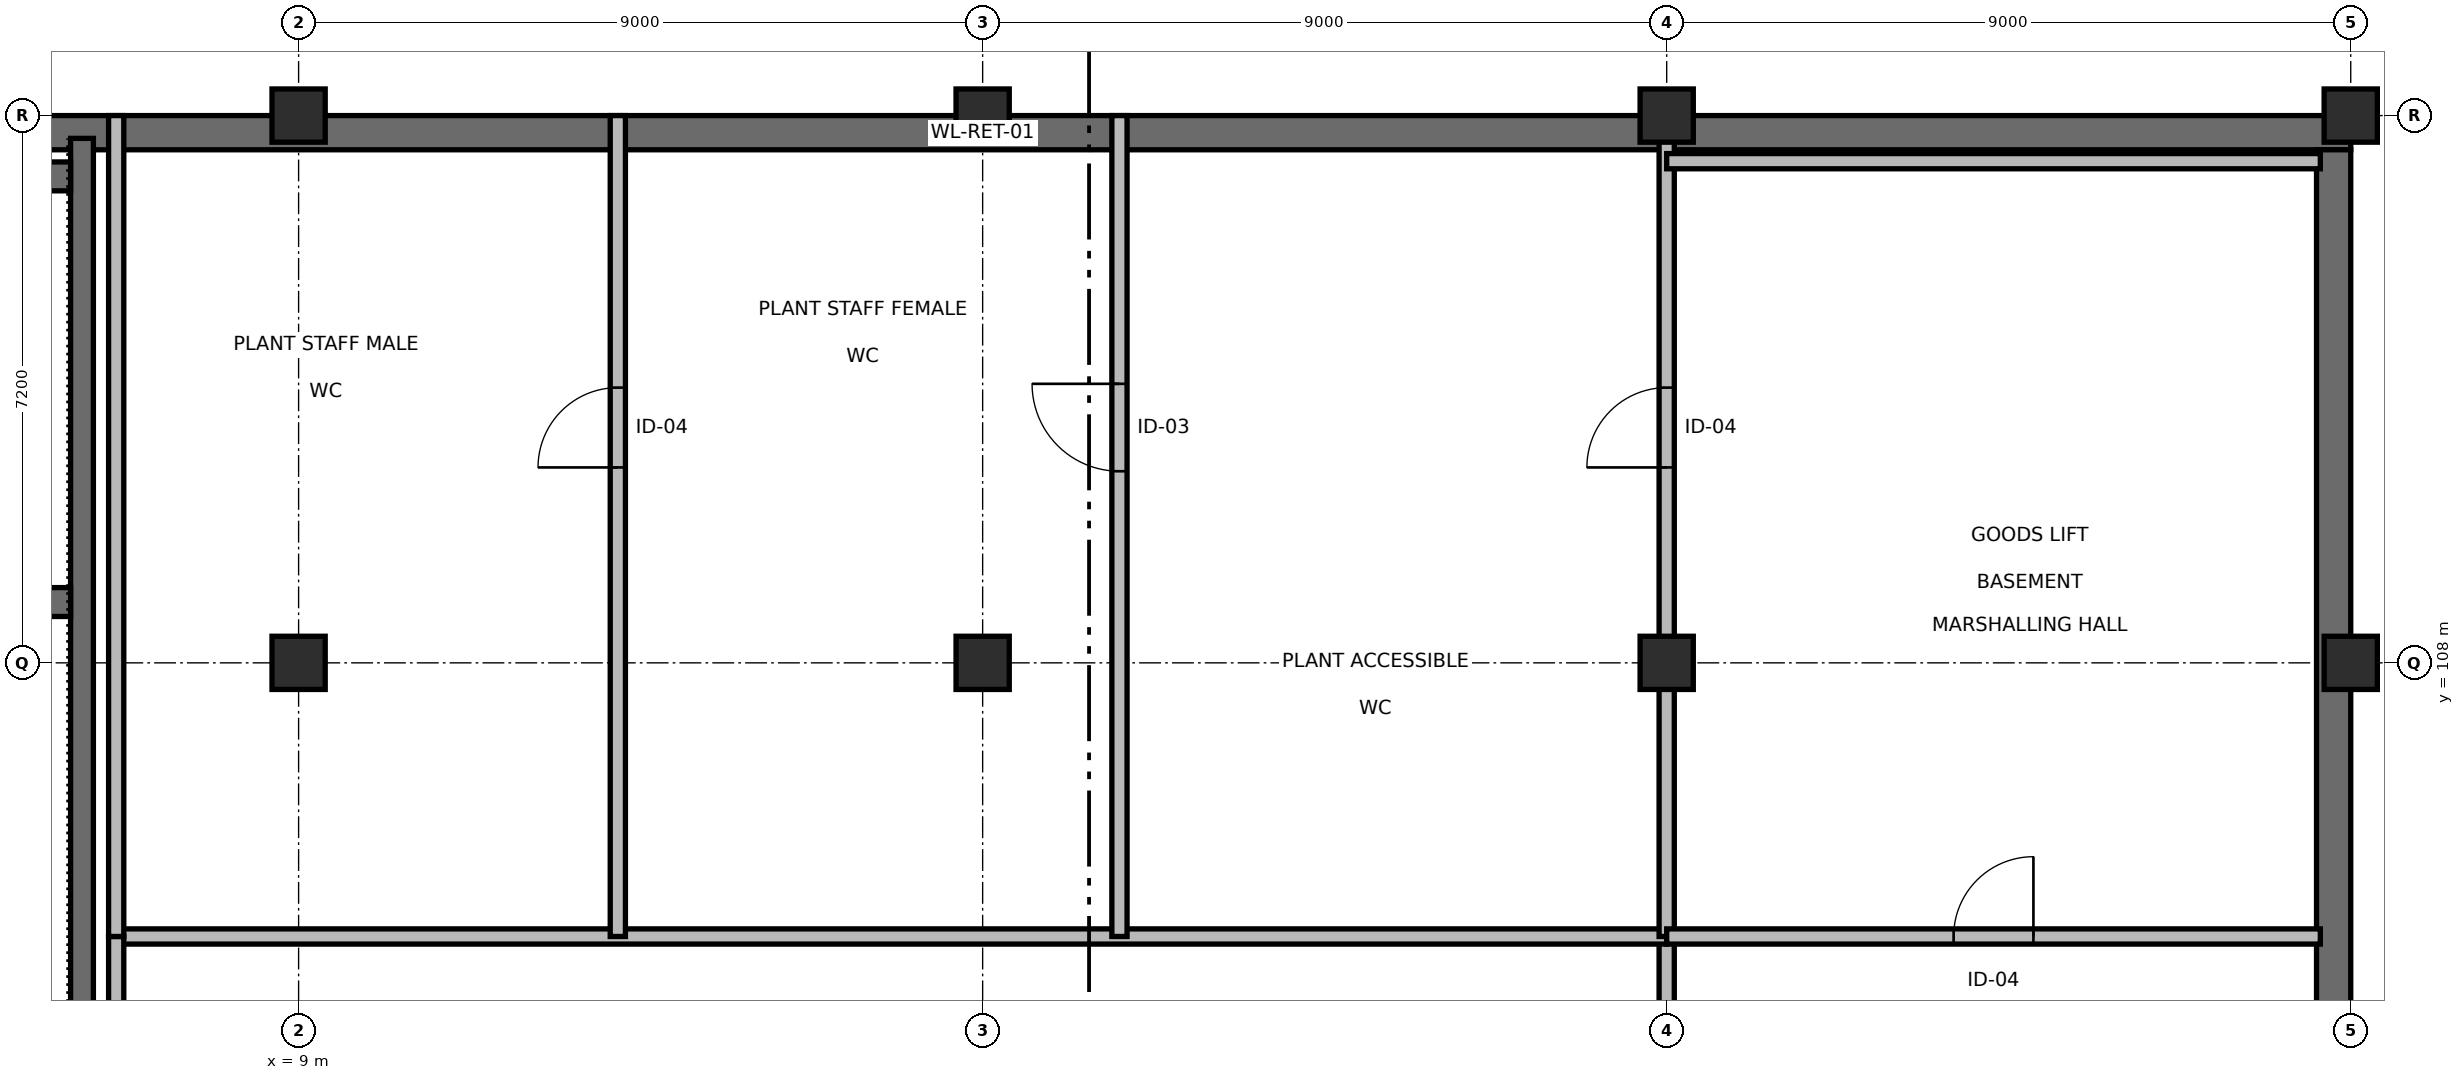
"""IFC4 building model, lengths in metres.
Left out: names, types, materials, properties, quantities, classifications, styles, units other than length and angle.
Written with IfcOpenShell. Run it as: python <this file> out.ifc"""

import sys

from ifc_helpers import new_model, si_unit, direction, frame, frame_2d, origin, origin_2d, place, context, subcontext, project, spatial, rectangle, extrude, element, fill, save


model = new_model("IFC4")
c1 = context("Model", 3, precision=1e-05, world=origin(), true_north=direction((0.0, 1.0)))
c2 = subcontext(c1, "Body", "Model", "MODEL_VIEW")
j1 = project(units=[si_unit("LENGTHUNIT", "METRE"), si_unit("PLANEANGLEUNIT", "RADIAN")], contexts=[c1])
p1 = place(None, origin())
s1 = spatial("IfcSite", under=j1, at=p1, CompositionType="ELEMENT")
p2 = place(p1, origin())
s2 = spatial("IfcBuilding", under=s1, at=p2, CompositionType="ELEMENT")
p3 = place(p2, frame((0.0, 0.0, -4.8)))
s3 = spatial("IfcBuildingStorey", under=s2, at=p3, CompositionType="ELEMENT", Elevation=-4.8)
for number, where, z_axis, x_axis in (
    (1, (9.0, 108.0, 0.0), (0.0, 0.0, 1.0), (1.0, 0.0, 0.0)),
    (2, (9.0, 115.2, 0.0), (0.0, 0.0, 1.0), (1.0, 0.0, 0.0)),
    (3, (18.0, 108.0, 0.0), (0.0, 0.0, 1.0), (1.0, 0.0, 0.0)),
    (4, (18.0, 115.2, 0.0), (0.0, 0.0, 1.0), (1.0, 0.0, 0.0)),
    (5, (27.0, 108.0, 0.0), (0.0, 0.0, 1.0), (1.0, 0.0, 0.0)),
    (6, (27.0, 115.2, 0.0), (0.0, 0.0, 1.0), (1.0, 0.0, 0.0)),
    (7, (36.0, 108.0, 0.0), (0.0, 0.0, 1.0), (1.0, 0.0, 0.0)),
    (8, (36.0, 115.2, 0.0), (0.0, 0.0, 1.0), (1.0, 0.0, 0.0)),
):
    element("IfcColumn", number, at=place(p3, frame(where, z_axis=z_axis, x_axis=x_axis)), inside=s3, PredefinedType="COLUMN", context=c2, shape_type="SweptSolid", body=[
        extrude(rectangle(XDim=0.7, YDim=0.7, at=origin_2d()), origin(), (0.0, 0.0, 1.0), 4.8),
    ])
p4 = place(p3, frame((0.0, 114.975, 0.0), z_axis=(0.0, 0.0, 1.0), x_axis=(1.0, 0.0, 0.0)))
e9 = element("IfcWall", 9, at=p4, inside=s3, PredefinedType="USERDEFINED", context=c2, shape_type="SweptSolid", body=[
    extrude(rectangle(XDim=36.0, YDim=0.45, at=frame_2d((18.0, 0.0))), origin(), (0.0, 0.0, 1.0), 4.5),
])
p5 = place(p3, frame((35.775, 4.65, 0.0), z_axis=(0.0, 0.0, 1.0), x_axis=(0.0, 1.0, 0.0)))
e10 = element("IfcWall", 10, at=p5, inside=s3, PredefinedType="USERDEFINED", context=c2, shape_type="SweptSolid", body=[
    extrude(rectangle(XDim=110.1, YDim=0.45, at=frame_2d((55.05, 0.0))), origin(), (0.0, 0.0, 1.0), 4.5),
])
p6 = place(p3, frame((6.15, 73.2, 0.0), z_axis=(0.0, 0.0, 1.0), x_axis=(0.0, 1.0, 0.0)))
e11 = element("IfcWall", 11, at=p6, inside=s3, PredefinedType="USERDEFINED", context=c2, shape_type="SweptSolid", body=[
    extrude(rectangle(XDim=41.7, YDim=0.3, at=frame_2d((20.85, 0.0))), origin(), (0.0, 0.0, 1.0), 4.45),
])
p7 = place(p3, frame((27.0, 86.4, 0.0), z_axis=(0.0, 0.0, 1.0), x_axis=(0.0, 1.0, 0.0)))
e12 = element("IfcWall", 12, at=p7, inside=s3, PredefinedType="PARTITIONING", context=c2, shape_type="SweptSolid", body=[
    extrude(rectangle(XDim=18.0, YDim=0.2, at=frame_2d((9.0, 0.0))), origin(), (0.0, 0.0, 1.0), 3.735),
])
p8 = place(p7, frame((4.465, 0.0, 0.0)))
e13 = element("IfcOpeningElement", 13, at=p8, cuts=e12, PredefinedType="OPENING", context=c2, shape_type="SweptSolid", body=[
    extrude(rectangle(XDim=1.15, YDim=2.2, at=frame_2d((0.575, 1.1))), frame((0.0, 0.11, 0.0), z_axis=(0.0, -1.0, 0.0), x_axis=(1.0, 0.0, 0.0)), (0.0, 0.0, 1.0), 0.22),
])
p9 = place(p3, frame((6.6, 104.4, 0.0), z_axis=(0.0, 0.0, 1.0), x_axis=(1.0, 0.0, 0.0)))
e14 = element("IfcWall", 14, at=p9, inside=s3, PredefinedType="PARTITIONING", context=c2, shape_type="SweptSolid", body=[
    extrude(rectangle(XDim=20.4, YDim=0.2, at=frame_2d((10.2, 0.0))), origin(), (0.0, 0.0, 1.0), 3.735),
])
p10 = place(p3, frame((6.6, 86.4, 0.0), z_axis=(0.0, 0.0, 1.0), x_axis=(0.0, 1.0, 0.0)))
e15 = element("IfcWall", 15, at=p10, inside=s3, PredefinedType="PARTITIONING", context=c2, shape_type="SweptSolid", body=[
    extrude(rectangle(XDim=18.0, YDim=0.2, at=frame_2d((9.0, 0.0))), origin(), (0.0, 0.0, 1.0), 4.485),
])
p11 = place(p3, frame((13.2, 104.4, 0.0), z_axis=(0.0, 0.0, 1.0), x_axis=(0.0, 1.0, 0.0)))
e16 = element("IfcWall", 16, at=p11, inside=s3, PredefinedType="PARTITIONING", context=c2, shape_type="SweptSolid", body=[
    extrude(rectangle(XDim=10.8, YDim=0.2, at=frame_2d((5.4, 0.0))), origin(), (0.0, 0.0, 1.0), 3.785),
])
p12 = place(p11, frame((6.171, 0.0, 0.0)))
e17 = element("IfcOpeningElement", 17, at=p12, cuts=e16, PredefinedType="OPENING", context=c2, shape_type="SweptSolid", body=[
    extrude(rectangle(XDim=1.05, YDim=2.15, at=frame_2d((0.525, 1.075))), frame((0.0, 0.11, 0.0), z_axis=(0.0, -1.0, 0.0), x_axis=(1.0, 0.0, 0.0)), (0.0, 0.0, 1.0), 0.22),
])
p13 = place(p3, frame((6.6, 104.4, 0.0), z_axis=(0.0, 0.0, 1.0), x_axis=(0.0, 1.0, 0.0)))
e18 = element("IfcWall", 18, at=p13, inside=s3, PredefinedType="PARTITIONING", context=c2, shape_type="SweptSolid", body=[
    extrude(rectangle(XDim=10.8, YDim=0.2, at=frame_2d((5.4, 0.0))), origin(), (0.0, 0.0, 1.0), 3.785),
])
p14 = place(p3, frame((19.8, 104.4, 0.0), z_axis=(0.0, 0.0, 1.0), x_axis=(0.0, 1.0, 0.0)))
e19 = element("IfcWall", 19, at=p14, inside=s3, PredefinedType="PARTITIONING", context=c2, shape_type="SweptSolid", body=[
    extrude(rectangle(XDim=10.8, YDim=0.2, at=frame_2d((5.4, 0.0))), origin(), (0.0, 0.0, 1.0), 3.785),
])
p15 = place(p14, frame((6.121, 0.0, 0.0)))
e20 = element("IfcOpeningElement", 20, at=p15, cuts=e19, PredefinedType="OPENING", context=c2, shape_type="SweptSolid", body=[
    extrude(rectangle(XDim=1.15, YDim=2.2, at=frame_2d((0.575, 1.1))), frame((0.0, 0.11, 0.0), z_axis=(0.0, -1.0, 0.0), x_axis=(1.0, 0.0, 0.0)), (0.0, 0.0, 1.0), 0.22),
])
p16 = place(p3, frame((27.0, 104.4, 0.0), z_axis=(0.0, 0.0, 1.0), x_axis=(0.0, 1.0, 0.0)))
e21 = element("IfcWall", 21, at=p16, inside=s3, PredefinedType="PARTITIONING", context=c2, shape_type="SweptSolid", body=[
    extrude(rectangle(XDim=10.8, YDim=0.2, at=frame_2d((5.4, 0.0))), origin(), (0.0, 0.0, 1.0), 3.735),
])
p17 = place(p16, frame((6.171, 0.0, 0.0)))
e22 = element("IfcOpeningElement", 22, at=p17, cuts=e21, PredefinedType="OPENING", context=c2, shape_type="SweptSolid", body=[
    extrude(rectangle(XDim=1.05, YDim=2.15, at=frame_2d((0.525, 1.075))), frame((0.0, 0.11, 0.0), z_axis=(0.0, -1.0, 0.0), x_axis=(1.0, 0.0, 0.0)), (0.0, 0.0, 1.0), 0.22),
])
p18 = place(p3, frame((27.0, 104.4, 0.0), z_axis=(0.0, 0.0, 1.0), x_axis=(1.0, 0.0, 0.0)))
e23 = element("IfcWall", 23, at=p18, inside=s3, PredefinedType="PARTITIONING", context=c2, shape_type="SweptSolid", body=[
    extrude(rectangle(XDim=8.6, YDim=0.2, at=frame_2d((4.3, 0.0))), origin(), (0.0, 0.0, 1.0), 3.735),
])
p19 = place(p18, frame((3.775, 0.0, 0.0)))
e24 = element("IfcOpeningElement", 24, at=p19, cuts=e23, PredefinedType="OPENING", context=c2, shape_type="SweptSolid", body=[
    extrude(rectangle(XDim=1.05, YDim=2.15, at=frame_2d((0.525, 1.075))), frame((0.0, 0.11, 0.0), z_axis=(0.0, -1.0, 0.0), x_axis=(1.0, 0.0, 0.0)), (0.0, 0.0, 1.0), 0.22),
])
p20 = place(p3, frame((27.0, 114.6, 0.0), z_axis=(0.0, 0.0, 1.0), x_axis=(1.0, 0.0, 0.0)))
e25 = element("IfcWall", 25, at=p20, inside=s3, PredefinedType="PARTITIONING", context=c2, shape_type="SweptSolid", body=[
    extrude(rectangle(XDim=8.6, YDim=0.2, at=frame_2d((4.3, 0.0))), origin(), (0.0, 0.0, 1.0), 3.935),
])
p21 = place(p3, frame((1.2, 114.4, 0.0), z_axis=(0.0, 0.0, 1.0), x_axis=(1.0, 0.0, 0.0)))
e26 = element("IfcWall", 26, at=p21, inside=s3, PredefinedType="SHEAR", context=c2, shape_type="SweptSolid", body=[
    extrude(rectangle(XDim=4.8, YDim=0.38, at=frame_2d((2.4, 0.0))), origin(), (0.0, 0.0, 1.0), 4.445),
])
p22 = place(p3, frame((1.2, 108.8, 0.0), z_axis=(0.0, 0.0, 1.0), x_axis=(1.0, 0.0, 0.0)))
e27 = element("IfcWall", 27, at=p22, inside=s3, PredefinedType="SHEAR", context=c2, shape_type="SweptSolid", body=[
    extrude(rectangle(XDim=4.8, YDim=0.38, at=frame_2d((2.4, 0.0))), origin(), (0.0, 0.0, 1.0), 3.76),
])
p23 = place(p12, origin())
e28 = element("IfcDoor", 28, at=p23, inside=s3, OperationType="SINGLE_SWING_LEFT", PredefinedType="DOOR", context=c2, shape_type="SweptSolid", body=[
    extrude(rectangle(XDim=1.05, YDim=2.15, at=frame_2d((0.525, 1.075))), frame((0.0, 0.025, 0.0), z_axis=(0.0, -1.0, 0.0), x_axis=(1.0, 0.0, 0.0)), (0.0, 0.0, 1.0), 0.05),
])
fill(e17, e28)
p24 = place(p15, origin())
e29 = element("IfcDoor", 29, at=p24, inside=s3, OperationType="SINGLE_SWING_RIGHT", PredefinedType="DOOR", context=c2, shape_type="SweptSolid", body=[
    extrude(rectangle(XDim=1.15, YDim=2.2, at=frame_2d((0.575, 1.1))), frame((0.0, 0.025, 0.0), z_axis=(0.0, -1.0, 0.0), x_axis=(1.0, 0.0, 0.0)), (0.0, 0.0, 1.0), 0.05),
])
fill(e20, e29)
p25 = place(p17, origin())
e30 = element("IfcDoor", 30, at=p25, inside=s3, OperationType="SINGLE_SWING_LEFT", PredefinedType="DOOR", context=c2, shape_type="SweptSolid", body=[
    extrude(rectangle(XDim=1.05, YDim=2.15, at=frame_2d((0.525, 1.075))), frame((0.0, 0.025, 0.0), z_axis=(0.0, -1.0, 0.0), x_axis=(1.0, 0.0, 0.0)), (0.0, 0.0, 1.0), 0.05),
])
fill(e22, e30)
p26 = place(p19, origin())
e31 = element("IfcDoor", 31, at=p26, inside=s3, OperationType="SINGLE_SWING_RIGHT", PredefinedType="DOOR", context=c2, shape_type="SweptSolid", body=[
    extrude(rectangle(XDim=1.05, YDim=2.15, at=frame_2d((0.525, 1.075))), frame((0.0, 0.025, 0.0), z_axis=(0.0, -1.0, 0.0), x_axis=(1.0, 0.0, 0.0)), (0.0, 0.0, 1.0), 0.05),
])
fill(e24, e31)
save(model, sys.argv[1])
